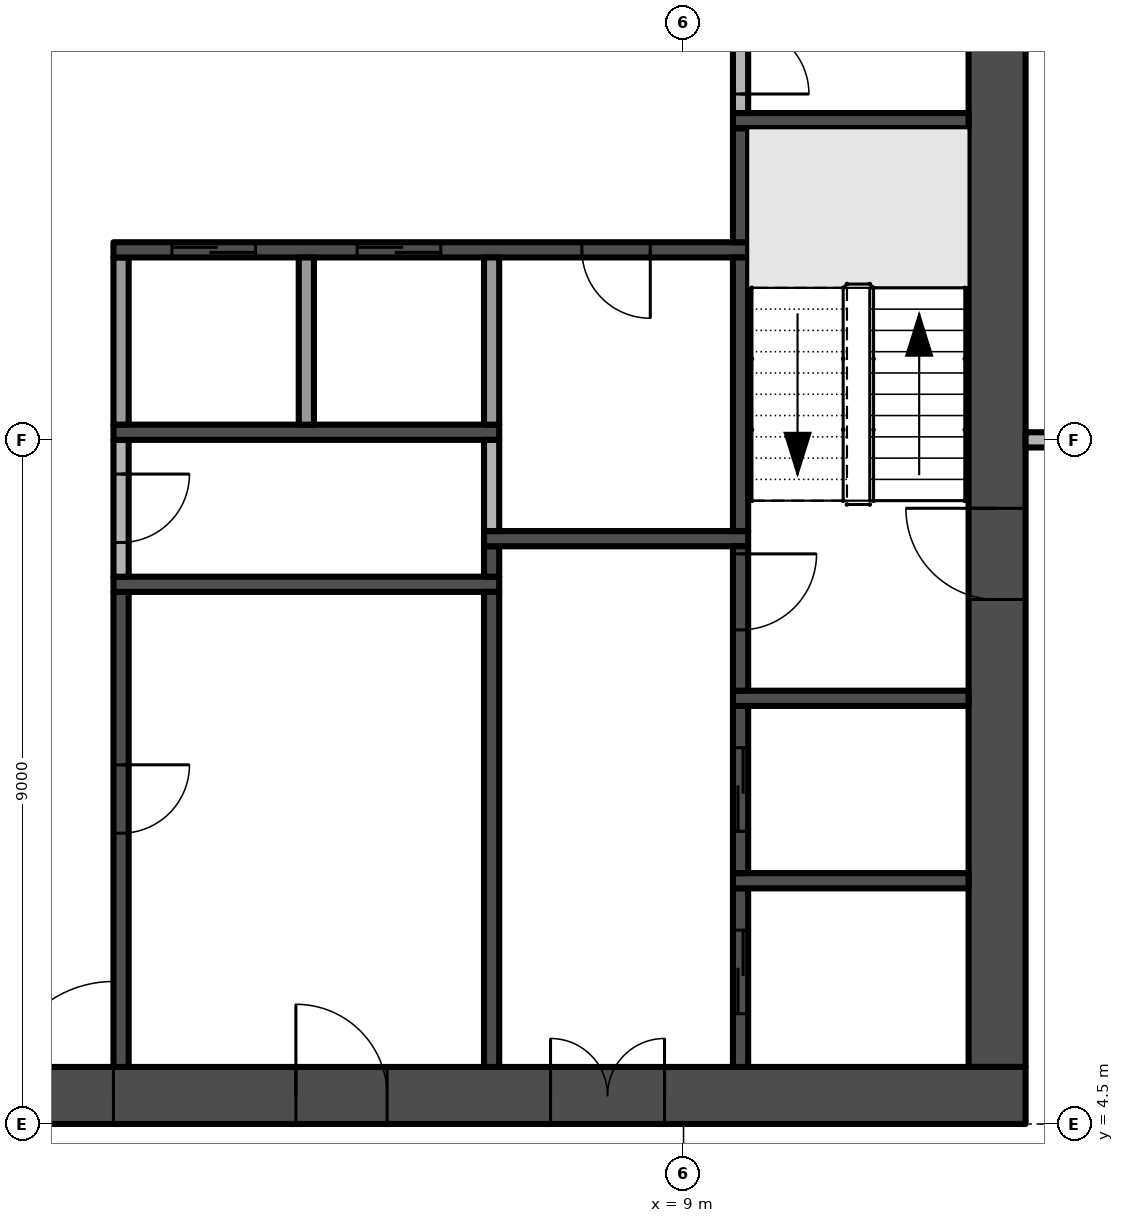
"""IFC4 building model, lengths in metres.
Left out: names, types, materials, properties, quantities, classifications, styles, units other than length and angle.
Written with IfcOpenShell. Run it as: python <this file> out.ifc"""

import sys

from ifc_helpers import new_model, si_unit, direction, frame, frame_2d, origin, place, context, subcontext, project, spatial, rectangle, extrude, element, fill, save


model = new_model("IFC4")
c1 = context("Model", 3, precision=1e-05, world=origin(), true_north=direction((0.0, 1.0)))
c2 = subcontext(c1, "Body", "Model", "MODEL_VIEW")
j1 = project(units=[si_unit("LENGTHUNIT", "METRE"), si_unit("PLANEANGLEUNIT", "RADIAN")], contexts=[c1])
p1 = place(None, origin())
s1 = spatial("IfcSite", under=j1, at=p1, CompositionType="ELEMENT")
p2 = place(p1, origin())
s2 = spatial("IfcBuilding", under=s1, at=p2, CompositionType="ELEMENT")
p3 = place(p2, frame((0.0, 0.0, 147.8)))
s3 = spatial("IfcBuildingStorey", under=s2, at=p3, CompositionType="ELEMENT", Elevation=147.8)
p4 = place(p3, frame((-13.5, 4.875, -0.3), z_axis=(0.0, 0.0, 1.0), x_axis=(1.0, 0.0, 0.0)))
e1 = element("IfcWall", 1, at=p4, inside=s3, PredefinedType="SHEAR", context=c2, shape_type="SweptSolid", body=[
    extrude(rectangle(XDim=27.0, YDim=0.75, at=frame_2d((13.5, 0.0))), origin(), (0.0, 0.0, 1.0), 3.8),
])
p5 = place(p4, frame((12.0, 0.0, 0.3)))
e2 = element("IfcOpeningElement", 2, at=p5, cuts=e1, PredefinedType="OPENING", context=c2, shape_type="SweptSolid", body=[
    extrude(rectangle(XDim=3.0, YDim=2.4, at=frame_2d((1.5, 1.2))), frame((0.0, 0.385, 0.0), z_axis=(0.0, -1.0, 0.0), x_axis=(1.0, 0.0, 0.0)), (0.0, 0.0, 1.0), 0.77),
])
p6 = place(p4, frame((4.9, 0.0, 0.3)))
e3 = element("IfcOpeningElement", 3, at=p6, cuts=e1, PredefinedType="OPENING", context=c2, shape_type="SweptSolid", body=[
    extrude(rectangle(XDim=1.2, YDim=2.2, at=frame_2d((0.6, 1.1))), frame((0.0, 0.385, 0.0), z_axis=(0.0, -1.0, 0.0), x_axis=(1.0, 0.0, 0.0)), (0.0, 0.0, 1.0), 0.77),
])
p7 = place(p4, frame((20.75, 0.0, 0.3)))
e4 = element("IfcOpeningElement", 4, at=p7, cuts=e1, PredefinedType="OPENING", context=c2, shape_type="SweptSolid", body=[
    extrude(rectangle(XDim=1.5, YDim=2.2, at=frame_2d((0.75, 1.1))), frame((0.0, 0.385, 0.0), z_axis=(0.0, -1.0, 0.0), x_axis=(1.0, 0.0, 0.0)), (0.0, 0.0, 1.0), 0.77),
])
p8 = place(p4, frame((17.4, 0.0, 0.3)))
e5 = element("IfcOpeningElement", 5, at=p8, cuts=e1, PredefinedType="OPENING", context=c2, shape_type="SweptSolid", body=[
    extrude(rectangle(XDim=1.2, YDim=2.2, at=frame_2d((0.6, 1.1))), frame((0.0, 0.385, 0.0), z_axis=(0.0, -1.0, 0.0), x_axis=(1.0, 0.0, 0.0)), (0.0, 0.0, 1.0), 0.77),
])
p9 = place(p3, frame((13.125, 5.25, -0.3), z_axis=(0.0, 0.0, 1.0), x_axis=(0.0, 1.0, 0.0)))
e6 = element("IfcWall", 6, at=p9, inside=s3, PredefinedType="SHEAR", context=c2, shape_type="SweptSolid", body=[
    extrude(rectangle(XDim=16.5, YDim=0.75, at=frame_2d((8.25, 0.0))), origin(), (0.0, 0.0, 1.0), 3.8),
])
p10 = place(p9, frame((6.15, 0.0, 0.3)))
e7 = element("IfcOpeningElement", 7, at=p10, cuts=e6, PredefinedType="OPENING", context=c2, shape_type="SweptSolid", body=[
    extrude(rectangle(XDim=1.2, YDim=2.2, at=frame_2d((0.6, 1.1))), frame((0.0, 0.385, 0.0), z_axis=(0.0, -1.0, 0.0), x_axis=(1.0, 0.0, 0.0)), (0.0, 0.0, 1.0), 0.77),
])
p11 = place(p3, frame((1.6, 11.5, 0.0), z_axis=(0.0, 0.0, 1.0), x_axis=(0.0, -1.0, 0.0)))
e8 = element("IfcWall", 8, at=p11, inside=s3, PredefinedType="SHEAR", context=c2, shape_type="SweptSolid", body=[
    extrude(rectangle(XDim=6.25, YDim=0.2, at=frame_2d((3.125, 0.0))), origin(), (0.0, 0.0, 1.0), 3.5),
])
p12 = place(p11, frame((2.275, 0.0, 0.0)))
e9 = element("IfcOpeningElement", 9, at=p12, cuts=e8, PredefinedType="OPENING", context=c2, shape_type="SweptSolid", body=[
    extrude(rectangle(XDim=0.9, YDim=2.1, at=frame_2d((0.45, 1.05))), frame((0.0, 0.11, 0.0), z_axis=(0.0, -1.0, 0.0), x_axis=(1.0, 0.0, 0.0)), (0.0, 0.0, 1.0), 0.22),
])
p13 = place(p3, frame((1.5, 11.6, 0.0), z_axis=(0.0, 0.0, 1.0), x_axis=(1.0, 0.0, 0.0)))
e10 = element("IfcWall", 10, at=p13, inside=s3, PredefinedType="SHEAR", context=c2, shape_type="SweptSolid", body=[
    extrude(rectangle(XDim=5.075, YDim=0.2, at=frame_2d((2.538, 0.0))), origin(), (0.0, 0.0, 1.0), 3.5),
])
p14 = place(p3, frame((1.6, 13.5, 0.0), z_axis=(0.0, 0.0, 1.0), x_axis=(0.0, -1.0, 0.0)))
e11 = element("IfcWall", 11, at=p14, inside=s3, PredefinedType="PARTITIONING", context=c2, shape_type="SweptSolid", body=[
    extrude(rectangle(XDim=1.8, YDim=0.2, at=frame_2d((0.9, 0.0))), origin(), (0.0, 0.0, 1.0), 3.5),
])
p15 = place(p14, frame((0.45, 0.0, 0.0)))
e12 = element("IfcOpeningElement", 12, at=p15, cuts=e11, PredefinedType="OPENING", context=c2, shape_type="SweptSolid", body=[
    extrude(rectangle(XDim=0.9, YDim=2.1, at=frame_2d((0.45, 1.05))), frame((0.0, 0.11, 0.0), z_axis=(0.0, -1.0, 0.0), x_axis=(1.0, 0.0, 0.0)), (0.0, 0.0, 1.0), 0.22),
])
p16 = place(p3, frame((1.5, 13.6, 0.0), z_axis=(0.0, 0.0, 1.0), x_axis=(1.0, 0.0, 0.0)))
e13 = element("IfcWall", 13, at=p16, inside=s3, PredefinedType="SHEAR", context=c2, shape_type="SweptSolid", body=[
    extrude(rectangle(XDim=5.075, YDim=0.2, at=frame_2d((2.538, 0.0))), origin(), (0.0, 0.0, 1.0), 3.5),
])
p17 = place(p3, frame((1.6, 13.7, 0.0), z_axis=(0.0, 0.0, 1.0), x_axis=(0.0, 1.0, 0.0)))
e14 = element("IfcWall", 14, at=p17, inside=s3, PredefinedType="PARTITIONING", context=c2, shape_type="SweptSolid", body=[
    extrude(rectangle(XDim=2.2, YDim=0.2, at=frame_2d((1.1, 0.0))), origin(), (0.0, 0.0, 1.0), 3.5),
])
p18 = place(p3, frame((9.85, 16.0, 0.0), z_axis=(0.0, 0.0, 1.0), x_axis=(-1.0, 0.0, 0.0)))
e15 = element("IfcWall", 15, at=p18, inside=s3, PredefinedType="SHEAR", context=c2, shape_type="SweptSolid", body=[
    extrude(rectangle(XDim=8.35, YDim=0.2, at=frame_2d((4.175, 0.0))), origin(), (0.0, 0.0, 1.0), 3.5),
])
p19 = place(p18, frame((6.481, 0.0, 0.0)))
e16 = element("IfcOpeningElement", 16, at=p19, cuts=e15, PredefinedType="OPENING", context=c2, shape_type="SweptSolid", body=[
    extrude(rectangle(XDim=1.1, YDim=2.1, at=frame_2d((0.55, 1.05))), frame((0.0, 0.11, 0.0), z_axis=(0.0, -1.0, 0.0), x_axis=(1.0, 0.0, 0.0)), (0.0, 0.0, 1.0), 0.22),
])
p20 = place(p18, frame((4.044, 0.0, 0.0)))
e17 = element("IfcOpeningElement", 17, at=p20, cuts=e15, PredefinedType="OPENING", context=c2, shape_type="SweptSolid", body=[
    extrude(rectangle(XDim=1.1, YDim=2.1, at=frame_2d((0.55, 1.05))), frame((0.0, 0.11, 0.0), z_axis=(0.0, -1.0, 0.0), x_axis=(1.0, 0.0, 0.0)), (0.0, 0.0, 1.0), 0.22),
])
p21 = place(p18, frame((1.288, 0.0, 0.0)))
e18 = element("IfcOpeningElement", 18, at=p21, cuts=e15, PredefinedType="OPENING", context=c2, shape_type="SweptSolid", body=[
    extrude(rectangle(XDim=0.9, YDim=2.1, at=frame_2d((0.45, 1.05))), frame((0.0, 0.11, 0.0), z_axis=(0.0, -1.0, 0.0), x_axis=(1.0, 0.0, 0.0)), (0.0, 0.0, 1.0), 0.22),
])
p22 = place(p3, frame((4.037, 13.7, 0.0), z_axis=(0.0, 0.0, 1.0), x_axis=(0.0, 1.0, 0.0)))
e19 = element("IfcWall", 19, at=p22, inside=s3, PredefinedType="PARTITIONING", context=c2, shape_type="SweptSolid", body=[
    extrude(rectangle(XDim=2.2, YDim=0.2, at=frame_2d((1.1, 0.0))), origin(), (0.0, 0.0, 1.0), 3.5),
])
p23 = place(p3, frame((6.475, 5.25, 0.0), z_axis=(0.0, 0.0, 1.0), x_axis=(0.0, 1.0, 0.0)))
e20 = element("IfcWall", 20, at=p23, inside=s3, PredefinedType="SHEAR", context=c2, shape_type="SweptSolid", body=[
    extrude(rectangle(XDim=6.25, YDim=0.2, at=frame_2d((3.125, 0.0))), origin(), (0.0, 0.0, 1.0), 3.5),
])
p24 = place(p3, frame((6.475, 11.7, 0.0), z_axis=(0.0, 0.0, 1.0), x_axis=(0.0, 1.0, 0.0)))
e21 = element("IfcWall", 21, at=p24, inside=s3, PredefinedType="SHEAR", context=c2, shape_type="SweptSolid", body=[
    extrude(rectangle(XDim=0.4, YDim=0.2, at=frame_2d((0.2, 0.0))), origin(), (0.0, 0.0, 1.0), 3.5),
])
p25 = place(p3, frame((6.375, 12.2, 0.0), z_axis=(0.0, 0.0, 1.0), x_axis=(1.0, 0.0, 0.0)))
e22 = element("IfcWall", 22, at=p25, inside=s3, PredefinedType="SHEAR", context=c2, shape_type="SweptSolid", body=[
    extrude(rectangle(XDim=3.475, YDim=0.2, at=frame_2d((1.738, 0.0))), origin(), (0.0, 0.0, 1.0), 3.5),
])
p26 = place(p3, frame((6.475, 12.3, 0.0), z_axis=(0.0, 0.0, 1.0), x_axis=(0.0, 1.0, 0.0)))
e23 = element("IfcWall", 23, at=p26, inside=s3, PredefinedType="PARTITIONING", context=c2, shape_type="SweptSolid", body=[
    extrude(rectangle(XDim=1.2, YDim=0.2, at=frame_2d((0.6, 0.0))), origin(), (0.0, 0.0, 1.0), 3.5),
])
p27 = place(p3, frame((6.475, 13.7, 0.0), z_axis=(0.0, 0.0, 1.0), x_axis=(0.0, 1.0, 0.0)))
e24 = element("IfcWall", 24, at=p27, inside=s3, PredefinedType="PARTITIONING", context=c2, shape_type="SweptSolid", body=[
    extrude(rectangle(XDim=2.2, YDim=0.2, at=frame_2d((1.1, 0.0))), origin(), (0.0, 0.0, 1.0), 3.5),
])
p28 = place(p3, frame((9.75, 5.25, 0.0), z_axis=(0.0, 0.0, 1.0), x_axis=(0.0, 1.0, 0.0)))
e25 = element("IfcWall", 25, at=p28, inside=s3, PredefinedType="SHEAR", context=c2, shape_type="SweptSolid", body=[
    extrude(rectangle(XDim=2.35, YDim=0.2, at=frame_2d((1.175, 0.0))), origin(), (0.0, 0.0, 1.0), 3.5),
])
p29 = place(p28, frame((0.7, 0.0, 0.0)))
e26 = element("IfcOpeningElement", 26, at=p29, cuts=e25, PredefinedType="OPENING", context=c2, shape_type="SweptSolid", body=[
    extrude(rectangle(XDim=1.1, YDim=2.1, at=frame_2d((0.55, 1.05))), frame((0.0, 0.11, 0.0), z_axis=(0.0, -1.0, 0.0), x_axis=(1.0, 0.0, 0.0)), (0.0, 0.0, 1.0), 0.22),
])
p30 = place(p3, frame((9.65, 7.7, 0.0), z_axis=(0.0, 0.0, 1.0), x_axis=(1.0, 0.0, 0.0)))
e27 = element("IfcWall", 27, at=p30, inside=s3, PredefinedType="SHEAR", context=c2, shape_type="SweptSolid", body=[
    extrude(rectangle(XDim=3.1, YDim=0.2, at=frame_2d((1.55, 0.0))), origin(), (0.0, 0.0, 1.0), 3.5),
])
p31 = place(p3, frame((9.75, 7.8, 0.0), z_axis=(0.0, 0.0, 1.0), x_axis=(0.0, 1.0, 0.0)))
e28 = element("IfcWall", 28, at=p31, inside=s3, PredefinedType="SHEAR", context=c2, shape_type="SweptSolid", body=[
    extrude(rectangle(XDim=2.2, YDim=0.2, at=frame_2d((1.1, 0.0))), origin(), (0.0, 0.0, 1.0), 3.5),
])
p32 = place(p31, frame((0.55, 0.0, 0.0)))
e29 = element("IfcOpeningElement", 29, at=p32, cuts=e28, PredefinedType="OPENING", context=c2, shape_type="SweptSolid", body=[
    extrude(rectangle(XDim=1.1, YDim=2.1, at=frame_2d((0.55, 1.05))), frame((0.0, 0.11, 0.0), z_axis=(0.0, -1.0, 0.0), x_axis=(1.0, 0.0, 0.0)), (0.0, 0.0, 1.0), 0.22),
])
p33 = place(p3, frame((9.65, 10.1, 0.0), z_axis=(0.0, 0.0, 1.0), x_axis=(1.0, 0.0, 0.0)))
e30 = element("IfcWall", 30, at=p33, inside=s3, PredefinedType="SHEAR", context=c2, shape_type="SweptSolid", body=[
    extrude(rectangle(XDim=3.1, YDim=0.2, at=frame_2d((1.55, 0.0))), origin(), (0.0, 0.0, 1.0), 3.5),
])
p34 = place(p3, frame((9.75, 12.1, 0.0), z_axis=(0.0, 0.0, 1.0), x_axis=(0.0, -1.0, 0.0)))
e31 = element("IfcWall", 31, at=p34, inside=s3, PredefinedType="SHEAR", context=c2, shape_type="SweptSolid", body=[
    extrude(rectangle(XDim=1.9, YDim=0.2, at=frame_2d((0.95, 0.0))), origin(), (0.0, 0.0, 1.0), 3.5),
])
p35 = place(p34, frame((0.1, 0.0, 0.0)))
e32 = element("IfcOpeningElement", 32, at=p35, cuts=e31, PredefinedType="OPENING", context=c2, shape_type="SweptSolid", body=[
    extrude(rectangle(XDim=1.0, YDim=2.2, at=frame_2d((0.5, 1.1))), frame((0.0, 0.11, 0.0), z_axis=(0.0, -1.0, 0.0), x_axis=(1.0, 0.0, 0.0)), (0.0, 0.0, 1.0), 0.22),
])
p36 = place(p3, frame((9.75, 12.3, 0.0), z_axis=(0.0, 0.0, 1.0), x_axis=(0.0, 1.0, 0.0)))
e33 = element("IfcWall", 33, at=p36, inside=s3, PredefinedType="SHEAR", context=c2, shape_type="SweptSolid", body=[
    extrude(rectangle(XDim=3.6, YDim=0.2, at=frame_2d((1.8, 0.0))), origin(), (0.0, 0.0, 1.0), 3.5),
])
p37 = place(p3, frame((9.75, 16.1, 0.0), z_axis=(0.0, 0.0, 1.0), x_axis=(0.0, 1.0, 0.0)))
e34 = element("IfcWall", 34, at=p37, inside=s3, PredefinedType="SHEAR", context=c2, shape_type="SweptSolid", body=[
    extrude(rectangle(XDim=1.5, YDim=0.2, at=frame_2d((0.75, 0.0))), origin(), (0.0, 0.0, 1.0), 3.5),
])
p38 = place(p3, frame((9.65, 17.7, 0.0), z_axis=(0.0, 0.0, 1.0), x_axis=(1.0, 0.0, 0.0)))
e35 = element("IfcWall", 35, at=p38, inside=s3, PredefinedType="SHEAR", context=c2, shape_type="SweptSolid", body=[
    extrude(rectangle(XDim=3.1, YDim=0.2, at=frame_2d((1.55, 0.0))), origin(), (0.0, 0.0, 1.0), 3.5),
])
p39 = place(p3, frame((9.75, 19.2, 0.0), z_axis=(0.0, 0.0, 1.0), x_axis=(0.0, -1.0, 0.0)))
e36 = element("IfcWall", 36, at=p39, inside=s3, PredefinedType="PARTITIONING", context=c2, shape_type="SweptSolid", body=[
    extrude(rectangle(XDim=1.4, YDim=0.2, at=frame_2d((0.7, 0.0))), origin(), (0.0, 0.0, 1.0), 3.5),
])
p40 = place(p39, frame((0.25, 0.0, 0.0)))
e37 = element("IfcOpeningElement", 37, at=p40, cuts=e36, PredefinedType="OPENING", context=c2, shape_type="SweptSolid", body=[
    extrude(rectangle(XDim=0.9, YDim=2.1, at=frame_2d((0.45, 1.05))), frame((0.0, 0.11, 0.0), z_axis=(0.0, -1.0, 0.0), x_axis=(1.0, 0.0, 0.0)), (0.0, 0.0, 1.0), 0.22),
])
p41 = place(p3, frame((13.5, 13.5, 0.0), z_axis=(0.0, 0.0, 1.0), x_axis=(1.0, 0.0, 0.0)))
e38 = element("IfcWall", 38, at=p41, inside=s3, PredefinedType="PARTITIONING", context=c2, shape_type="SweptSolid", body=[
    extrude(rectangle(XDim=3.875, YDim=0.2, at=frame_2d((1.938, 0.0))), origin(), (0.0, 0.0, 1.0), 3.5),
])
p42 = place(p41, frame((1.6, 0.0, 0.0)))
e39 = element("IfcOpeningElement", 39, at=p42, cuts=e38, PredefinedType="OPENING", context=c2, shape_type="SweptSolid", body=[
    extrude(rectangle(XDim=0.9, YDim=2.1, at=frame_2d((0.45, 1.05))), frame((0.0, 0.11, 0.0), z_axis=(0.0, -1.0, 0.0), x_axis=(1.0, 0.0, 0.0)), (0.0, 0.0, 1.0), 0.22),
])
p43 = place(p5, frame((3.0, 0.0, 0.0), z_axis=(0.0, 0.0, 1.0), x_axis=(-1.0, 0.0, 0.0)))
e40 = element("IfcDoor", 40, at=p43, inside=s3, OperationType="DOUBLE_DOOR_SINGLE_SWING", PredefinedType="DOOR", context=c2, shape_type="SweptSolid", body=[
    extrude(rectangle(XDim=3.0, YDim=2.4, at=frame_2d((1.5, 1.2))), frame((0.0, 0.025, 0.0), z_axis=(0.0, -1.0, 0.0), x_axis=(1.0, 0.0, 0.0)), (0.0, 0.0, 1.0), 0.05),
])
fill(e2, e40)
p44 = place(p10, frame((1.2, 0.0, 0.0), z_axis=(0.0, 0.0, 1.0), x_axis=(-1.0, 0.0, 0.0)))
e41 = element("IfcDoor", 41, at=p44, inside=s3, OperationType="SINGLE_SWING_LEFT", PredefinedType="DOOR", context=c2, shape_type="SweptSolid", body=[
    extrude(rectangle(XDim=1.2, YDim=2.2, at=frame_2d((0.6, 1.1))), frame((0.0, 0.025, 0.0), z_axis=(0.0, -1.0, 0.0), x_axis=(1.0, 0.0, 0.0)), (0.0, 0.0, 1.0), 0.05),
])
fill(e7, e41)
p45 = place(p7, frame((1.5, 0.0, 0.0), z_axis=(0.0, 0.0, 1.0), x_axis=(-1.0, 0.0, 0.0)))
e42 = element("IfcDoor", 42, at=p45, inside=s3, OperationType="DOUBLE_DOOR_SINGLE_SWING", PredefinedType="DOOR", context=c2, shape_type="SweptSolid", body=[
    extrude(rectangle(XDim=1.5, YDim=2.2, at=frame_2d((0.75, 1.1))), frame((0.0, 0.025, 0.0), z_axis=(0.0, -1.0, 0.0), x_axis=(1.0, 0.0, 0.0)), (0.0, 0.0, 1.0), 0.05),
])
fill(e4, e42)
p46 = place(p8, frame((1.2, 0.0, 0.0), z_axis=(0.0, 0.0, 1.0), x_axis=(-1.0, 0.0, 0.0)))
e43 = element("IfcDoor", 43, at=p46, inside=s3, OperationType="SINGLE_SWING_RIGHT", PredefinedType="DOOR", context=c2, shape_type="SweptSolid", body=[
    extrude(rectangle(XDim=1.2, YDim=2.2, at=frame_2d((0.6, 1.1))), frame((0.0, 0.025, 0.0), z_axis=(0.0, -1.0, 0.0), x_axis=(1.0, 0.0, 0.0)), (0.0, 0.0, 1.0), 0.05),
])
fill(e5, e43)
p47 = place(p35, origin())
e44 = element("IfcDoor", 44, at=p47, inside=s3, OperationType="SINGLE_SWING_LEFT", PredefinedType="DOOR", context=c2, shape_type="SweptSolid", body=[
    extrude(rectangle(XDim=1.0, YDim=2.2, at=frame_2d((0.5, 1.1))), frame((0.0, 0.025, 0.0), z_axis=(0.0, -1.0, 0.0), x_axis=(1.0, 0.0, 0.0)), (0.0, 0.0, 1.0), 0.05),
])
fill(e32, e44)
p48 = place(p19, origin())
e45 = element("IfcDoor", 45, at=p48, inside=s3, OperationType="SLIDING_TO_RIGHT", PredefinedType="DOOR", context=c2, shape_type="SweptSolid", body=[
    extrude(rectangle(XDim=1.1, YDim=2.1, at=frame_2d((0.55, 1.05))), frame((0.0, 0.025, 0.0), z_axis=(0.0, -1.0, 0.0), x_axis=(1.0, 0.0, 0.0)), (0.0, 0.0, 1.0), 0.05),
])
fill(e16, e45)
p49 = place(p20, origin())
e46 = element("IfcDoor", 46, at=p49, inside=s3, OperationType="SLIDING_TO_RIGHT", PredefinedType="DOOR", context=c2, shape_type="SweptSolid", body=[
    extrude(rectangle(XDim=1.1, YDim=2.1, at=frame_2d((0.55, 1.05))), frame((0.0, 0.025, 0.0), z_axis=(0.0, -1.0, 0.0), x_axis=(1.0, 0.0, 0.0)), (0.0, 0.0, 1.0), 0.05),
])
fill(e17, e46)
p50 = place(p29, origin())
e47 = element("IfcDoor", 47, at=p50, inside=s3, OperationType="SLIDING_TO_RIGHT", PredefinedType="DOOR", context=c2, shape_type="SweptSolid", body=[
    extrude(rectangle(XDim=1.1, YDim=2.1, at=frame_2d((0.55, 1.05))), frame((0.0, 0.025, 0.0), z_axis=(0.0, -1.0, 0.0), x_axis=(1.0, 0.0, 0.0)), (0.0, 0.0, 1.0), 0.05),
])
fill(e26, e47)
p51 = place(p32, origin())
e48 = element("IfcDoor", 48, at=p51, inside=s3, OperationType="SLIDING_TO_RIGHT", PredefinedType="DOOR", context=c2, shape_type="SweptSolid", body=[
    extrude(rectangle(XDim=1.1, YDim=2.1, at=frame_2d((0.55, 1.05))), frame((0.0, 0.025, 0.0), z_axis=(0.0, -1.0, 0.0), x_axis=(1.0, 0.0, 0.0)), (0.0, 0.0, 1.0), 0.05),
])
fill(e29, e48)
p52 = place(p12, origin())
e49 = element("IfcDoor", 49, at=p52, inside=s3, OperationType="SINGLE_SWING_LEFT", PredefinedType="DOOR", context=c2, shape_type="SweptSolid", body=[
    extrude(rectangle(XDim=0.9, YDim=2.1, at=frame_2d((0.45, 1.05))), frame((0.0, 0.025, 0.0), z_axis=(0.0, -1.0, 0.0), x_axis=(1.0, 0.0, 0.0)), (0.0, 0.0, 1.0), 0.05),
])
fill(e9, e49)
p53 = place(p15, origin())
e50 = element("IfcDoor", 50, at=p53, inside=s3, OperationType="SINGLE_SWING_LEFT", PredefinedType="DOOR", context=c2, shape_type="SweptSolid", body=[
    extrude(rectangle(XDim=0.9, YDim=2.1, at=frame_2d((0.45, 1.05))), frame((0.0, 0.025, 0.0), z_axis=(0.0, -1.0, 0.0), x_axis=(1.0, 0.0, 0.0)), (0.0, 0.0, 1.0), 0.05),
])
fill(e12, e50)
p54 = place(p21, origin())
e51 = element("IfcDoor", 51, at=p54, inside=s3, OperationType="SINGLE_SWING_LEFT", PredefinedType="DOOR", context=c2, shape_type="SweptSolid", body=[
    extrude(rectangle(XDim=0.9, YDim=2.1, at=frame_2d((0.45, 1.05))), frame((0.0, 0.025, 0.0), z_axis=(0.0, -1.0, 0.0), x_axis=(1.0, 0.0, 0.0)), (0.0, 0.0, 1.0), 0.05),
])
fill(e18, e51)
p55 = place(p40, origin())
e52 = element("IfcDoor", 52, at=p55, inside=s3, OperationType="SINGLE_SWING_RIGHT", PredefinedType="DOOR", context=c2, shape_type="SweptSolid", body=[
    extrude(rectangle(XDim=0.9, YDim=2.1, at=frame_2d((0.45, 1.05))), frame((0.0, 0.025, 0.0), z_axis=(0.0, -1.0, 0.0), x_axis=(1.0, 0.0, 0.0)), (0.0, 0.0, 1.0), 0.05),
])
fill(e37, e52)
save(model, sys.argv[1])
